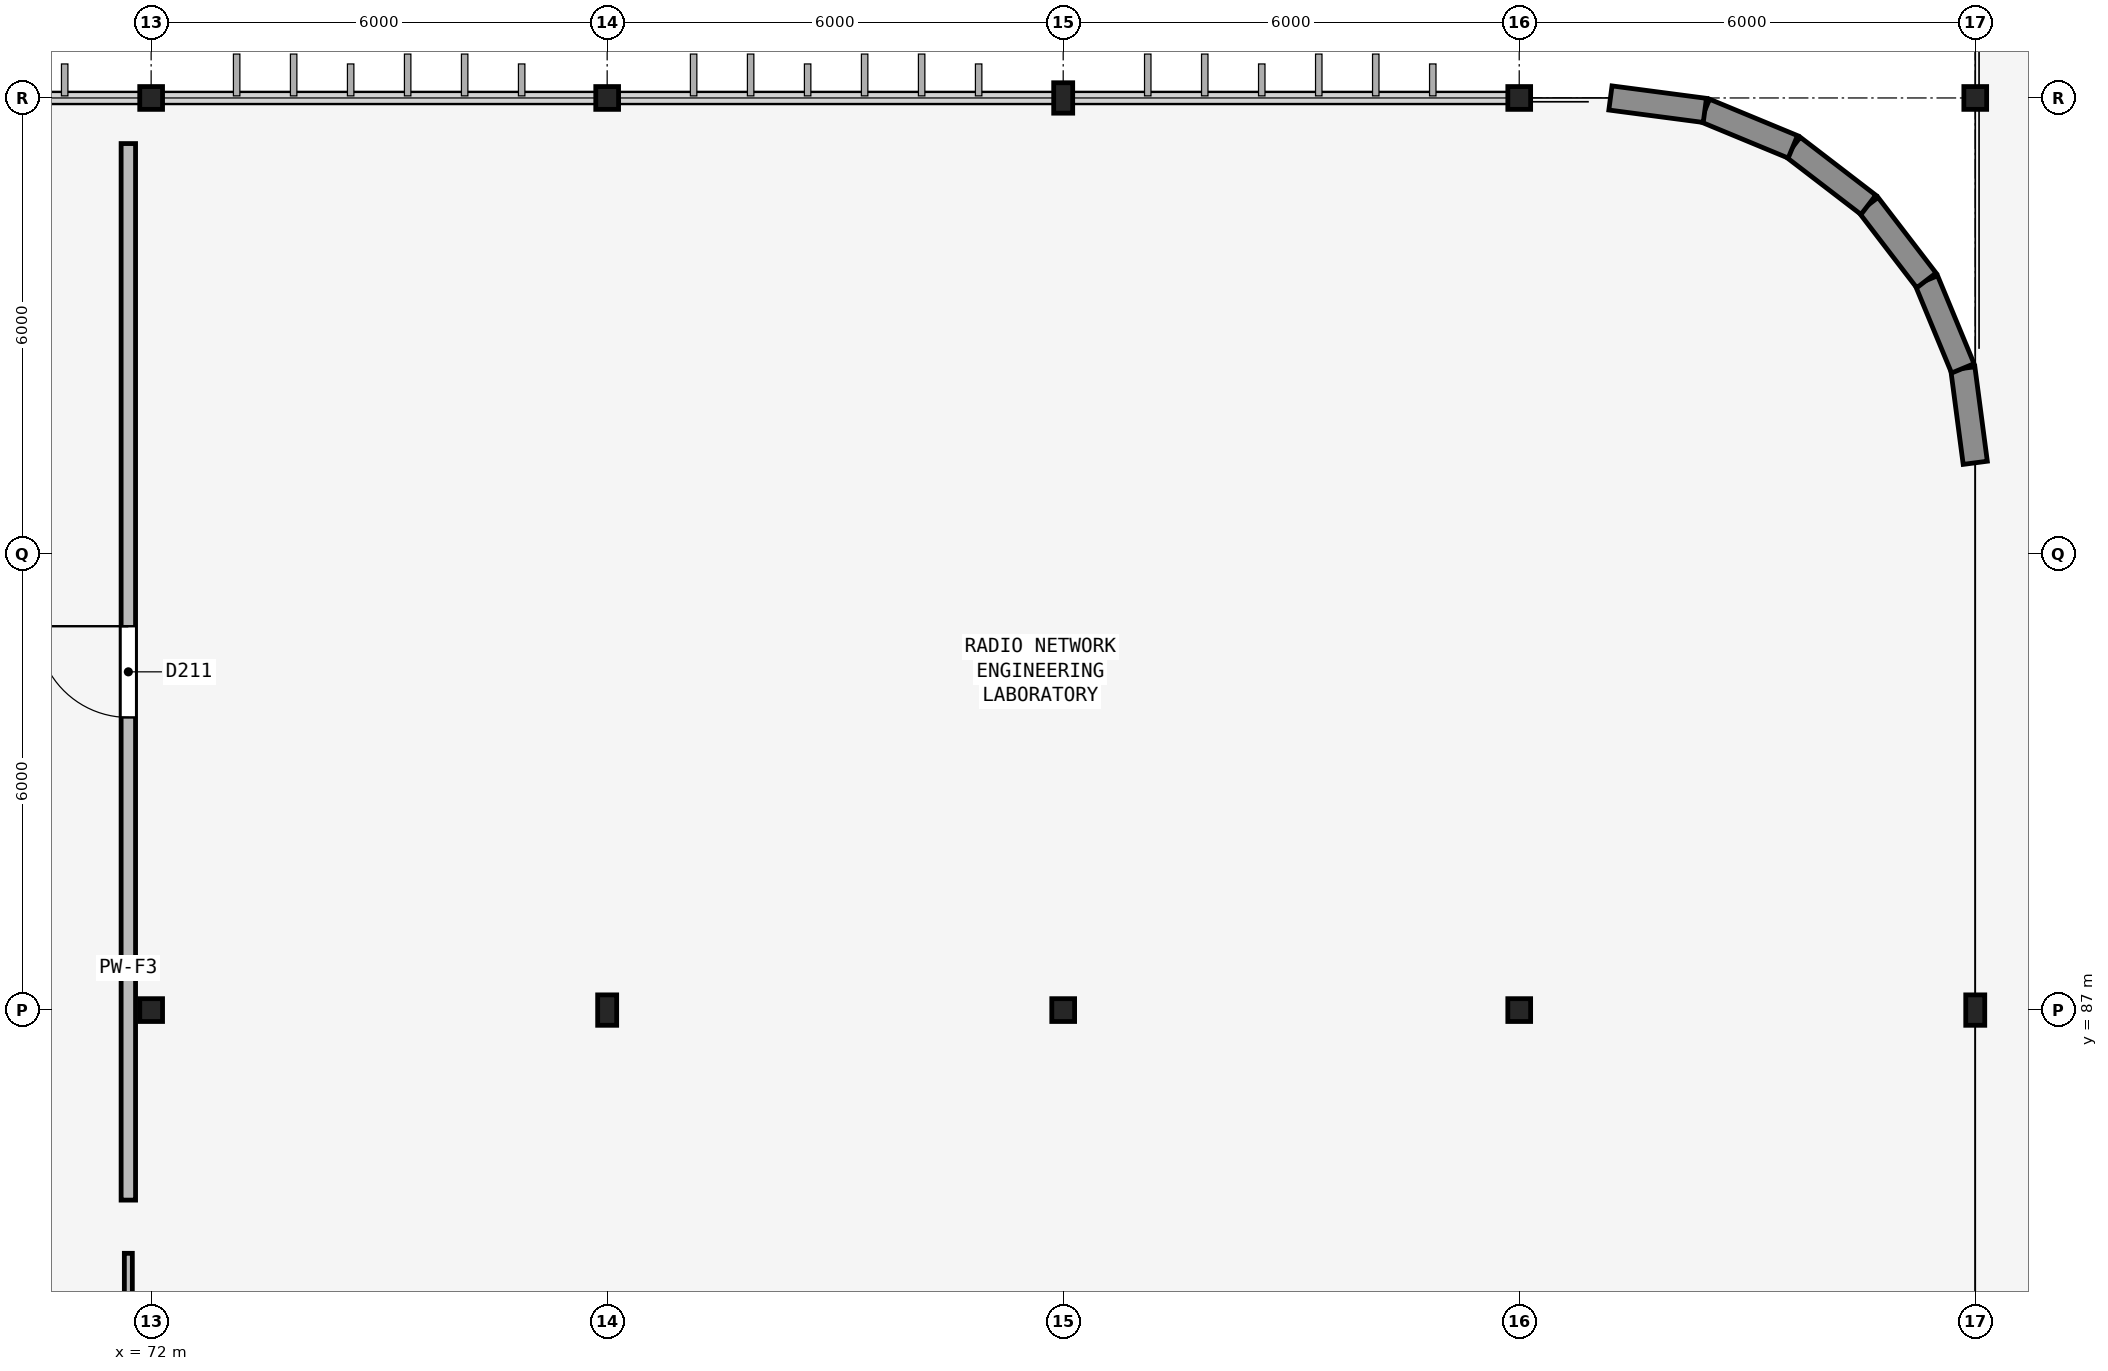
"""IFC4 building model, lengths in metres.
Left out: names, types, materials, properties, quantities, classifications, styles, units other than length and angle.
Written with IfcOpenShell. Run it as: python <this file> out.ifc"""

import sys

from ifc_helpers import new_model, si_unit, direction, frame, frame_2d, origin, origin_2d, place, context, subcontext, project, spatial, rectangle, hollow_rectangle, i_section, extrude, element, fill, save


model = new_model("IFC4")
c1 = context("Model", 3, precision=1e-05, world=origin(), true_north=direction((0.0, 1.0)))
c2 = subcontext(c1, "Body", "Model", "MODEL_VIEW")
j1 = project(units=[si_unit("LENGTHUNIT", "METRE"), si_unit("PLANEANGLEUNIT", "RADIAN")], contexts=[c1])
p1 = place(None, origin())
s1 = spatial("IfcSite", under=j1, at=p1, CompositionType="ELEMENT")
p2 = place(p1, origin())
s2 = spatial("IfcBuilding", under=s1, at=p2, CompositionType="ELEMENT")
p3 = place(p2, frame((0.0, 0.0, 4.8)))
s3 = spatial("IfcBuildingStorey", under=s2, at=p3, CompositionType="ELEMENT", Elevation=4.8)
for number, where, z_axis, x_axis in (
    (1, (72.0, 87.0, 0.0), (0.0, 0.0, 1.0), (1.0, 0.0, 0.0)),
    (2, (72.0, 99.0, 0.0), (0.0, 0.0, 1.0), (1.0, 0.0, 0.0)),
):
    element("IfcColumn", number, at=place(p3, frame(where, z_axis=z_axis, x_axis=x_axis)), inside=s3, PredefinedType="COLUMN", context=c2, shape_type="SweptSolid", body=[
        extrude(hollow_rectangle(XDim=0.3, YDim=0.3, WallThickness=0.016, InnerFilletRadius=0.016, OuterFilletRadius=0.032, at=origin_2d()), origin(), (0.0, 0.0, 1.0), 4.5),
    ])
p4 = place(p3, frame((78.0, 87.0, 0.0), z_axis=(0.0, 0.0, 1.0), x_axis=(1.0, 0.0, 0.0)))
e3 = element("IfcColumn", 3, at=p4, inside=s3, PredefinedType="COLUMN", context=c2, shape_type="SweptSolid", body=[
    extrude(i_section(OverallWidth=0.25, OverallDepth=0.4, WebThickness=0.01, FlangeThickness=0.013, FilletRadius=0.014, at=origin_2d()), origin(), (0.0, 0.0, 1.0), 4.5),
])
for number, where, z_axis, x_axis in (
    (4, (78.0, 99.0, 0.0), (0.0, 0.0, 1.0), (1.0, 0.0, 0.0)),
    (5, (84.0, 87.0, 0.0), (0.0, 0.0, 1.0), (1.0, 0.0, 0.0)),
):
    element("IfcColumn", number, at=place(p3, frame(where, z_axis=z_axis, x_axis=x_axis)), inside=s3, PredefinedType="COLUMN", context=c2, shape_type="SweptSolid", body=[
        extrude(hollow_rectangle(XDim=0.3, YDim=0.3, WallThickness=0.016, InnerFilletRadius=0.016, OuterFilletRadius=0.032, at=origin_2d()), origin(), (0.0, 0.0, 1.0), 4.5),
    ])
p5 = place(p3, frame((84.0, 99.0, 0.0), z_axis=(0.0, 0.0, 1.0), x_axis=(1.0, 0.0, 0.0)))
e6 = element("IfcColumn", 6, at=p5, inside=s3, PredefinedType="COLUMN", context=c2, shape_type="SweptSolid", body=[
    extrude(i_section(OverallWidth=0.25, OverallDepth=0.4, WebThickness=0.01, FlangeThickness=0.013, FilletRadius=0.014, at=origin_2d()), origin(), (0.0, 0.0, 1.0), 4.5),
])
for number, where, z_axis, x_axis in (
    (7, (90.0, 87.0, 0.0), (0.0, 0.0, 1.0), (1.0, 0.0, 0.0)),
    (8, (90.0, 99.0, 0.0), (0.0, 0.0, 1.0), (1.0, 0.0, 0.0)),
):
    element("IfcColumn", number, at=place(p3, frame(where, z_axis=z_axis, x_axis=x_axis)), inside=s3, PredefinedType="COLUMN", context=c2, shape_type="SweptSolid", body=[
        extrude(hollow_rectangle(XDim=0.3, YDim=0.3, WallThickness=0.016, InnerFilletRadius=0.016, OuterFilletRadius=0.032, at=origin_2d()), origin(), (0.0, 0.0, 1.0), 4.5),
    ])
p6 = place(p3, frame((96.0, 87.0, 0.0), z_axis=(0.0, 0.0, 1.0), x_axis=(1.0, 0.0, 0.0)))
e9 = element("IfcColumn", 9, at=p6, inside=s3, PredefinedType="COLUMN", context=c2, shape_type="SweptSolid", body=[
    extrude(i_section(OverallWidth=0.25, OverallDepth=0.4, WebThickness=0.01, FlangeThickness=0.013, FilletRadius=0.014, at=origin_2d()), origin(), (0.0, 0.0, 1.0), 4.5),
])
p7 = place(p3, frame((96.0, 99.0, 0.0), z_axis=(0.0, 0.0, 1.0), x_axis=(1.0, 0.0, 0.0)))
e10 = element("IfcColumn", 10, at=p7, inside=s3, PredefinedType="COLUMN", context=c2, shape_type="SweptSolid", body=[
    extrude(hollow_rectangle(XDim=0.3, YDim=0.3, WallThickness=0.016, InnerFilletRadius=0.016, OuterFilletRadius=0.032, at=origin_2d()), origin(), (0.0, 0.0, 1.0), 4.5),
])
for number, where, z_axis, x_axis in (
    (11, (96.0, 94.2, 0.0), (0.0, 0.0, 1.0), (-0.131, 0.991, 0.0)),
    (12, (95.836, 95.442, 0.0), (0.0, 0.0, 1.0), (-0.383, 0.924, 0.0)),
):
    element("IfcWall", number, at=place(p3, frame(where, z_axis=z_axis, x_axis=x_axis)), inside=s3, PredefinedType="SOLIDWALL", context=c2, shape_type="SweptSolid", body=[
        extrude(rectangle(XDim=1.253, YDim=0.32, at=frame_2d((0.626, 0.0))), origin(), (0.0, 0.0, 1.0), 3.39),
    ])
for number, where, z_axis, x_axis in (
    (13, (95.357, 96.6, 0.0), (0.0, 0.0, 1.0), (-0.609, 0.793, 0.0)),
    (14, (94.594, 97.594, 0.0), (0.0, 0.0, 1.0), (-0.793, 0.609, 0.0)),
):
    element("IfcWall", number, at=place(p3, frame(where, z_axis=z_axis, x_axis=x_axis)), inside=s3, PredefinedType="SOLIDWALL", context=c2, shape_type="SweptSolid", body=[
        extrude(rectangle(XDim=1.253, YDim=0.32, at=frame_2d((0.626, 0.0))), origin(), (0.0, 0.0, 1.0), 4.195),
    ])
for number, where, z_axis, x_axis in (
    (15, (93.6, 98.357, 0.0), (0.0, 0.0, 1.0), (-0.924, 0.383, 0.0)),
    (16, (92.442, 98.836, 0.0), (0.0, 0.0, 1.0), (-0.991, 0.131, 0.0)),
):
    element("IfcWall", number, at=place(p3, frame(where, z_axis=z_axis, x_axis=x_axis)), inside=s3, PredefinedType="SOLIDWALL", context=c2, shape_type="SweptSolid", body=[
        extrude(rectangle(XDim=1.253, YDim=0.32, at=frame_2d((0.626, 0.0))), origin(), (0.0, 0.0, 1.0), 3.94),
    ])
p8 = place(p3, frame((71.7, 69.5, 0.0), z_axis=(0.0, 0.0, 1.0), x_axis=(0.0, 1.0, 0.0)))
e17 = element("IfcWall", 17, at=p8, inside=s3, PredefinedType="PARTITIONING", context=c2, shape_type="SweptSolid", body=[
    extrude(rectangle(XDim=14.3, YDim=0.105, at=frame_2d((7.15, 0.0))), origin(), (0.0, 0.0, 1.0), 3.69),
])
p9 = place(p8, frame((6.675, 0.0, 0.0)))
e18 = element("IfcOpeningElement", 18, at=p9, cuts=e17, PredefinedType="OPENING", context=c2, shape_type="SweptSolid", body=[
    extrude(rectangle(XDim=0.95, YDim=2.15, at=frame_2d((0.475, 1.075))), frame((0.0, 0.062, 0.0), z_axis=(0.0, -1.0, 0.0), x_axis=(1.0, 0.0, 0.0)), (0.0, 0.0, 1.0), 0.125),
])
p10 = place(p8, frame((8.275, 0.0, 1.15)))
e19 = element("IfcOpeningElement", 19, at=p10, cuts=e17, PredefinedType="OPENING", context=c2, shape_type="SweptSolid", body=[
    extrude(rectangle(XDim=1.2, YDim=0.9, at=frame_2d((0.6, 0.45))), frame((0.0, 0.062, 0.0), z_axis=(0.0, -1.0, 0.0), x_axis=(1.0, 0.0, 0.0)), (0.0, 0.0, 1.0), 0.125),
])
p11 = place(p3, frame((71.7, 84.5, 0.0), z_axis=(0.0, 0.0, 1.0), x_axis=(0.0, 1.0, 0.0)))
e20 = element("IfcWall", 20, at=p11, inside=s3, PredefinedType="PARTITIONING", context=c2, shape_type="SweptSolid", body=[
    extrude(rectangle(XDim=13.9, YDim=0.19, at=frame_2d((6.95, 0.0))), origin(), (0.0, 0.0, 1.0), 3.39),
])
p12 = place(p11, frame((6.35, 0.0, 0.0)))
e21 = element("IfcOpeningElement", 21, at=p12, cuts=e20, PredefinedType="OPENING", context=c2, shape_type="SweptSolid", body=[
    extrude(rectangle(XDim=1.2, YDim=2.15, at=frame_2d((0.6, 1.075))), frame((0.0, 0.105, 0.0), z_axis=(0.0, -1.0, 0.0), x_axis=(1.0, 0.0, 0.0)), (0.0, 0.0, 1.0), 0.21),
])
p13 = place(p12, origin())
e22 = element("IfcDoor", 22, at=p13, inside=s3, OperationType="SINGLE_SWING_RIGHT", PredefinedType="DOOR", context=c2, shape_type="SweptSolid", body=[
    extrude(rectangle(XDim=1.2, YDim=2.15, at=frame_2d((0.6, 1.075))), frame((0.0, 0.025, 0.0), z_axis=(0.0, -1.0, 0.0), x_axis=(1.0, 0.0, 0.0)), (0.0, 0.0, 1.0), 0.05),
])
fill(e21, e22)
save(model, sys.argv[1])
